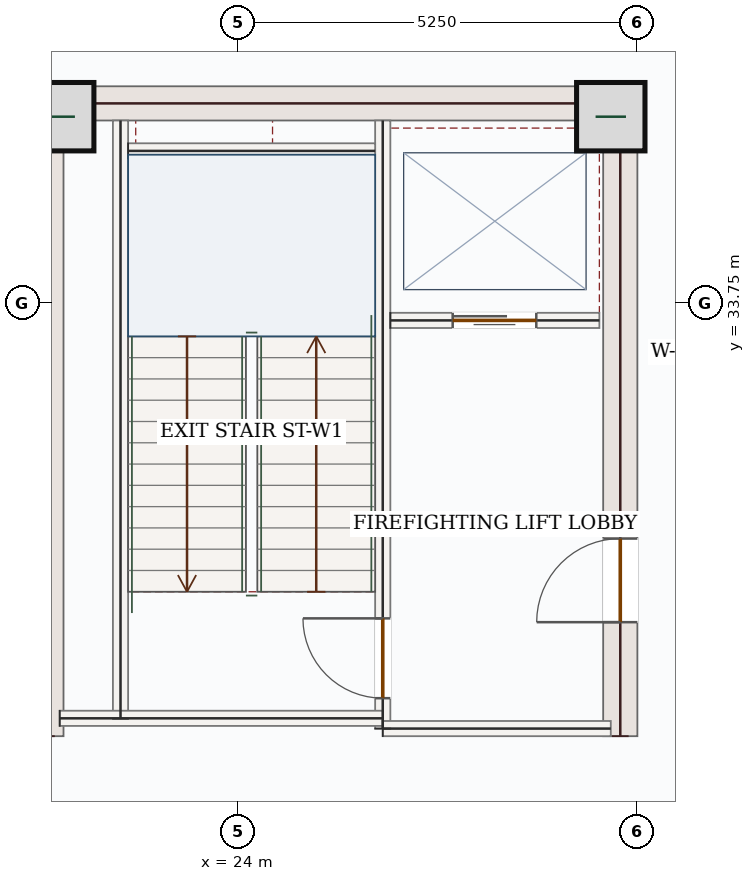
"""IFC4 building model, lengths in metres.
Left out: names, types, materials, properties, quantities, classifications, styles, units other than length and angle.
Written with IfcOpenShell. Run it as: python <this file> out.ifc"""

import sys

from ifc_helpers import new_model, si_unit, direction, frame, frame_2d, origin, origin_2d, place, context, subcontext, project, spatial, rectangle, extrude, source, transform, mapped, element, fill, save


model = new_model("IFC4")
c1 = context("Model", 3, precision=1e-05, world=origin(), true_north=direction((0.0, 1.0)))
c2 = subcontext(c1, "Body", "Model", "MODEL_VIEW")
j1 = project(units=[si_unit("LENGTHUNIT", "METRE"), si_unit("PLANEANGLEUNIT", "RADIAN")], contexts=[c1])
p1 = place(None, origin())
s1 = spatial("IfcSite", under=j1, at=p1, CompositionType="ELEMENT")
p2 = place(p1, origin())
s2 = spatial("IfcBuilding", under=s1, at=p2, CompositionType="ELEMENT")
p3 = place(p2, frame((0.0, 0.0, 365.85)))
s3 = spatial("IfcBuildingStorey", under=s2, at=p3, CompositionType="ELEMENT", Elevation=365.85)
m1 = source(origin(), c2, "Body", "SweptSolid", [
    extrude(rectangle(XDim=8.55, YDim=0.45, at=frame_2d((4.275, 0.0))), origin(), (0.0, 0.0, 1.0), 4.55),
])
p4 = place(p3, frame((21.475, 28.05, 0.0), z_axis=(0.0, 0.0, 1.0), x_axis=(0.0, 1.0, 0.0)))
e1 = element("IfcWall", 1, at=p4, inside=s3, PredefinedType="SHEAR", context=c2, shape_type="MappedRepresentation", body=[
    mapped(m1, transform((0.0, 0.0, 0.0), x_axis=(1.0, 0.0, 0.0), y_axis=(0.0, 1.0, 0.0), z_axis=(0.0, 0.0, 1.0), scale=1.0)),
])
p5 = place(p3, frame((29.025, 28.05, 0.0), z_axis=(0.0, 0.0, 1.0), x_axis=(0.0, 1.0, 0.0)))
e2 = element("IfcWall", 2, at=p5, inside=s3, PredefinedType="SHEAR", context=c2, shape_type="SweptSolid", body=[
    extrude(rectangle(XDim=8.55, YDim=0.45, at=frame_2d((4.275, 0.0))), origin(), (0.0, 0.0, 1.0), 4.55),
])
p6 = place(p5, frame((1.5, 0.0, 0.0)))
e3 = element("IfcOpeningElement", 3, at=p6, cuts=e2, PredefinedType="OPENING", context=c2, shape_type="SweptSolid", body=[
    extrude(rectangle(XDim=1.1, YDim=2.2, at=frame_2d((0.55, 1.1))), frame((0.0, 0.235, 0.0), z_axis=(0.0, -1.0, 0.0), x_axis=(1.0, 0.0, 0.0)), (0.0, 0.0, 1.0), 0.47),
])
m2 = source(origin(), c2, "Body", "SweptSolid", [
    extrude(rectangle(XDim=7.1, YDim=0.45, at=frame_2d((3.55, 0.0))), origin(), (0.0, 0.0, 1.0), 4.55),
])
p7 = place(p3, frame((21.7, 36.375, 0.0), z_axis=(0.0, 0.0, 1.0), x_axis=(1.0, 0.0, 0.0)))
e4 = element("IfcWall", 4, at=p7, inside=s3, PredefinedType="SHEAR", context=c2, shape_type="MappedRepresentation", body=[
    mapped(m2, transform((0.0, 0.0, 0.0), x_axis=(1.0, 0.0, 0.0), y_axis=(0.0, 1.0, 0.0), z_axis=(0.0, 0.0, 1.0), scale=1.0)),
])
m3 = source(origin(), c2, "Body", "SweptSolid", [
    extrude(rectangle(XDim=0.9, YDim=0.9, at=origin_2d()), origin(), (0.0, 0.0, 1.0), 4.8),
])
for number, where, z_axis, x_axis in (
    (5, (21.65, 36.2, 0.0), (0.0, 0.0, 1.0), (1.0, 0.0, 0.0)),
    (6, (28.9, 36.2, 0.0), (0.0, 0.0, 1.0), (1.0, 0.0, 0.0)),
):
    element("IfcColumn", number, at=place(p3, frame(where, z_axis=z_axis, x_axis=x_axis)), inside=s3, PredefinedType="COLUMN", context=c2, shape_type="MappedRepresentation", body=[
        mapped(m3, transform((0.0, 0.0, 0.0), x_axis=(1.0, 0.0, 0.0), y_axis=(0.0, 1.0, 0.0), z_axis=(0.0, 0.0, 1.0), scale=1.0)),
    ])
p8 = place(p3, frame((18.94, 35.542, 0.0), z_axis=(0.0, 0.0, 1.0), x_axis=(0.707106781187, 0.707106781187, 0.0)))
e7 = element("IfcWall", 7, at=p8, inside=s3, PredefinedType="SOLIDWALL", context=c2, shape_type="SweptSolid", body=[
    extrude(rectangle(XDim=5.258, YDim=0.28, at=frame_2d((2.629, 0.0))), origin(), (0.0, 0.0, 1.0), 4.55),
])
p9 = place(p8, frame((1.879, 0.0, 0.85)))
e8 = element("IfcOpeningElement", 8, at=p9, cuts=e7, PredefinedType="OPENING", context=c2, shape_type="SweptSolid", body=[
    extrude(rectangle(XDim=1.5, YDim=1.5, at=frame_2d((0.75, 0.75))), frame((0.0, 0.15, 0.0), z_axis=(0.0, -1.0, 0.0), x_axis=(1.0, 0.0, 0.0)), (0.0, 0.0, 1.0), 0.3),
])
m4 = source(origin(), c2, "Body", "SweptSolid", [
    extrude(rectangle(XDim=7.87, YDim=0.2, at=frame_2d((3.935, 0.0))), origin(), (0.0, 0.0, 1.0), 4.55),
])
p10 = place(p3, frame((22.45, 28.28, 0.0), z_axis=(0.0, 0.0, 1.0), x_axis=(0.0, 1.0, 0.0)))
e9 = element("IfcWall", 9, at=p10, inside=s3, PredefinedType="SOLIDWALL", context=c2, shape_type="MappedRepresentation", body=[
    mapped(m4, transform((0.0, 0.0, 0.0), x_axis=(1.0, 0.0, 0.0), y_axis=(0.0, 1.0, 0.0), z_axis=(0.0, 0.0, 1.0), scale=1.0)),
])
p11 = place(p3, frame((25.9, 28.15, 0.0), z_axis=(0.0, 0.0, 1.0), x_axis=(0.0, 1.0, 0.0)))
e10 = element("IfcWall", 10, at=p11, inside=s3, PredefinedType="SOLIDWALL", context=c2, shape_type="SweptSolid", body=[
    extrude(rectangle(XDim=8.0, YDim=0.2, at=frame_2d((4.0, 0.0))), origin(), (0.0, 0.0, 1.0), 4.55),
])
p12 = place(p11, frame((0.4, 0.0, 0.0)))
e11 = element("IfcOpeningElement", 11, at=p12, cuts=e10, PredefinedType="OPENING", context=c2, shape_type="SweptSolid", body=[
    extrude(rectangle(XDim=1.05, YDim=2.15, at=frame_2d((0.525, 1.075))), frame((0.0, 0.11, 0.0), z_axis=(0.0, -1.0, 0.0), x_axis=(1.0, 0.0, 0.0)), (0.0, 0.0, 1.0), 0.22),
])
m5 = source(origin(), c2, "Body", "SweptSolid", [
    extrude(rectangle(XDim=4.25, YDim=0.2, at=frame_2d((2.125, 0.0))), origin(), (0.0, 0.0, 1.0), 4.55),
])
p13 = place(p3, frame((21.65, 28.285, 0.0), z_axis=(0.0, 0.0, 1.0), x_axis=(1.0, 0.0, 0.0)))
e12 = element("IfcWall", 12, at=p13, inside=s3, PredefinedType="SOLIDWALL", context=c2, shape_type="MappedRepresentation", body=[
    mapped(m5, transform((0.0, 0.0, 0.0), x_axis=(1.0, 0.0, 0.0), y_axis=(0.0, 1.0, 0.0), z_axis=(0.0, 0.0, 1.0), scale=1.0)),
])
m6 = source(origin(), c2, "Body", "SweptSolid", [
    extrude(rectangle(XDim=3.0, YDim=0.2, at=frame_2d((1.5, 0.0))), origin(), (0.0, 0.0, 1.0), 4.55),
])
p14 = place(p3, frame((25.9, 28.15, 0.0), z_axis=(0.0, 0.0, 1.0), x_axis=(1.0, 0.0, 0.0)))
e13 = element("IfcWall", 13, at=p14, inside=s3, PredefinedType="SOLIDWALL", context=c2, shape_type="MappedRepresentation", body=[
    mapped(m6, transform((0.0, 0.0, 0.0), x_axis=(1.0, 0.0, 0.0), y_axis=(0.0, 1.0, 0.0), z_axis=(0.0, 0.0, 1.0), scale=1.0)),
])
m7 = source(origin(), c2, "Body", "SweptSolid", [
    extrude(rectangle(XDim=3.25, YDim=0.2, at=frame_2d((1.625, 0.0))), origin(), (0.0, 0.0, 1.0), 4.55),
])
p15 = place(p3, frame((22.55, 35.75, 0.0), z_axis=(0.0, 0.0, 1.0), x_axis=(1.0, 0.0, 0.0)))
e14 = element("IfcWall", 14, at=p15, inside=s3, PredefinedType="SOLIDWALL", context=c2, shape_type="MappedRepresentation", body=[
    mapped(m7, transform((0.0, 0.0, 0.0), x_axis=(1.0, 0.0, 0.0), y_axis=(0.0, 1.0, 0.0), z_axis=(0.0, 0.0, 1.0), scale=1.0)),
])
p16 = place(p3, frame((26.0, 33.52, 0.0), z_axis=(0.0, 0.0, 1.0), x_axis=(1.0, 0.0, 0.0)))
e15 = element("IfcWall", 15, at=p16, inside=s3, PredefinedType="SOLIDWALL", context=c2, shape_type="SweptSolid", body=[
    extrude(rectangle(XDim=2.75, YDim=0.2, at=frame_2d((1.375, 0.0))), origin(), (0.0, 0.0, 1.0), 4.55),
])
p17 = place(p16, frame((0.82, 0.0, 0.0)))
e16 = element("IfcOpeningElement", 16, at=p17, cuts=e15, PredefinedType="OPENING", context=c2, shape_type="SweptSolid", body=[
    extrude(rectangle(XDim=1.1, YDim=2.15, at=frame_2d((0.55, 1.075))), frame((0.0, 0.11, 0.0), z_axis=(0.0, -1.0, 0.0), x_axis=(1.0, 0.0, 0.0)), (0.0, 0.0, 1.0), 0.22),
])
m8 = source(origin(), c2, "Body", "SweptSolid", [
    extrude(rectangle(XDim=1.05, YDim=2.15, at=frame_2d((0.525, 1.075))), frame((0.0, 0.025, 0.0), z_axis=(0.0, -1.0, 0.0), x_axis=(1.0, 0.0, 0.0)), (0.0, 0.0, 1.0), 0.05),
])
p18 = place(p12, origin())
e17 = element("IfcDoor", 17, at=p18, inside=s3, OperationType="SINGLE_SWING_RIGHT", PredefinedType="DOOR", context=c2, shape_type="MappedRepresentation", body=[
    mapped(m8, transform((0.0, 0.0, 0.0), x_axis=(1.0, 0.0, 0.0), y_axis=(0.0, 1.0, 0.0), z_axis=(0.0, 0.0, 1.0), scale=1.0)),
])
fill(e11, e17)
m9 = source(origin(), c2, "Body", "SweptSolid", [
    extrude(rectangle(XDim=1.1, YDim=2.15, at=frame_2d((0.55, 1.075))), frame((0.0, 0.025, 0.0), z_axis=(0.0, -1.0, 0.0), x_axis=(1.0, 0.0, 0.0)), (0.0, 0.0, 1.0), 0.05),
])
p19 = place(p17, origin())
e18 = element("IfcDoor", 18, at=p19, inside=s3, OperationType="DOUBLE_DOOR_SLIDING", PredefinedType="DOOR", context=c2, shape_type="MappedRepresentation", body=[
    mapped(m9, transform((0.0, 0.0, 0.0), x_axis=(1.0, 0.0, 0.0), y_axis=(0.0, 1.0, 0.0), z_axis=(0.0, 0.0, 1.0), scale=1.0)),
])
fill(e16, e18)
m10 = source(origin(), c2, "Body", "SweptSolid", [
    extrude(rectangle(XDim=1.1, YDim=2.2, at=frame_2d((0.55, 1.1))), frame((0.0, 0.025, 0.0), z_axis=(0.0, -1.0, 0.0), x_axis=(1.0, 0.0, 0.0)), (0.0, 0.0, 1.0), 0.05),
])
p20 = place(p6, origin())
e19 = element("IfcDoor", 19, at=p20, inside=s3, OperationType="SINGLE_SWING_LEFT", PredefinedType="DOOR", context=c2, shape_type="MappedRepresentation", body=[
    mapped(m10, transform((0.0, 0.0, 0.0), x_axis=(1.0, 0.0, 0.0), y_axis=(0.0, 1.0, 0.0), z_axis=(0.0, 0.0, 1.0), scale=1.0)),
])
fill(e3, e19)
save(model, sys.argv[1])
